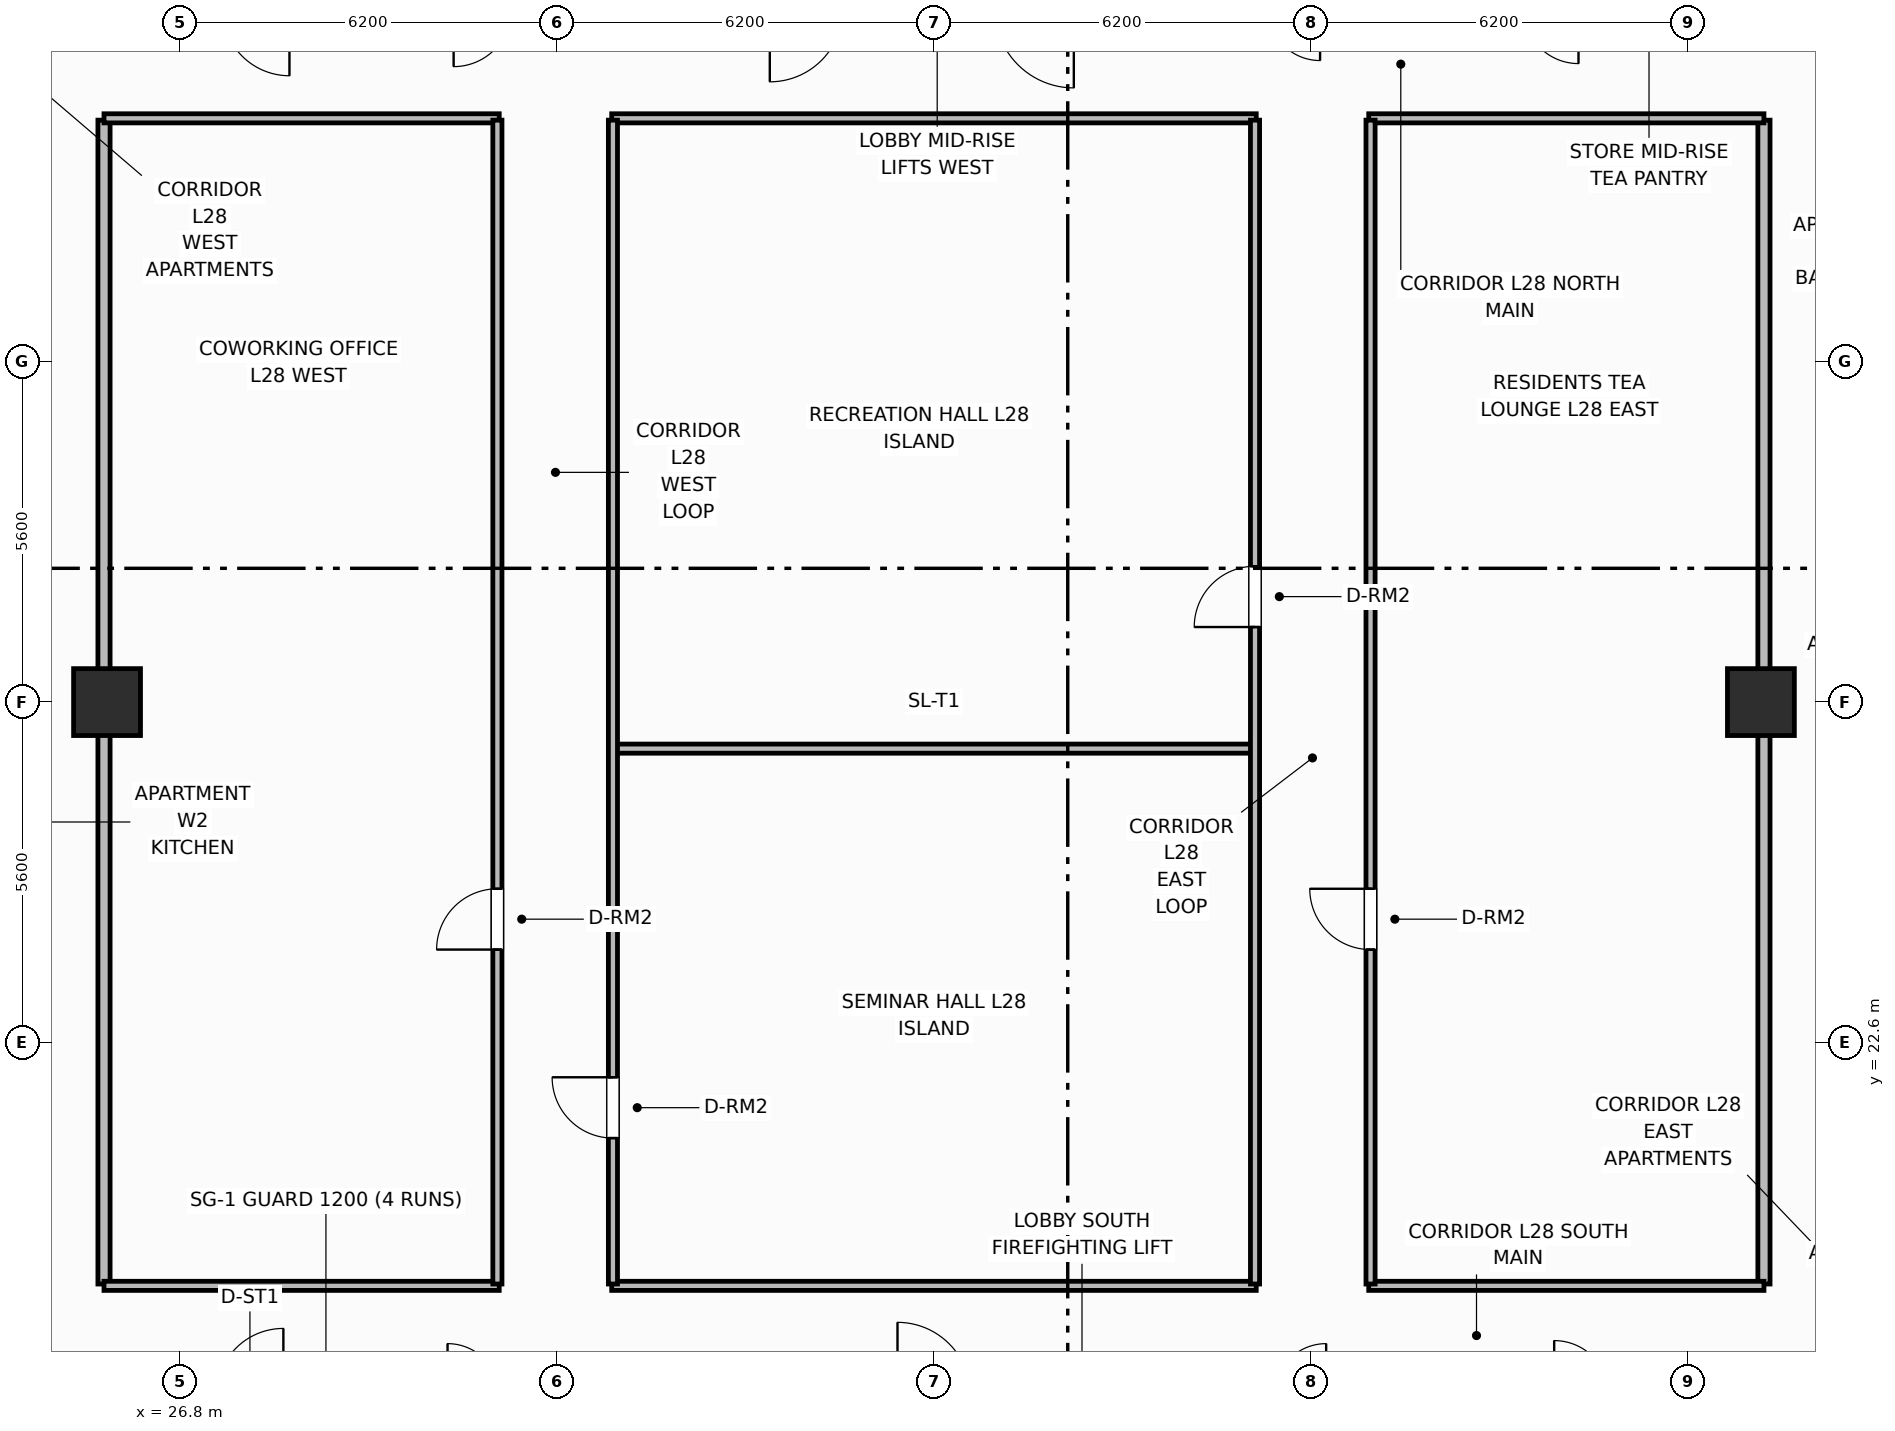
"""IFC4 building model, lengths in metres.
Left out: names, types, materials, properties, quantities, classifications, styles, units other than length and angle.
Written with IfcOpenShell. Run it as: python <this file> out.ifc"""

import sys

from ifc_helpers import new_model, si_unit, direction, frame, frame_2d, origin, origin_2d, place, context, subcontext, project, spatial, rectangle, extrude, element, fill, save


model = new_model("IFC4")
c1 = context("Model", 3, precision=1e-05, world=origin(), true_north=direction((0.0, 1.0)))
c2 = subcontext(c1, "Body", "Model", "MODEL_VIEW")
j1 = project(units=[si_unit("LENGTHUNIT", "METRE"), si_unit("PLANEANGLEUNIT", "RADIAN")], contexts=[c1])
p1 = place(None, origin())
s1 = spatial("IfcSite", under=j1, at=p1, CompositionType="ELEMENT")
p2 = place(p1, origin())
s2 = spatial("IfcBuilding", under=s1, at=p2, CompositionType="ELEMENT")
p3 = place(p2, frame((0.0, 0.0, 114.2)))
s3 = spatial("IfcBuildingStorey", under=s2, at=p3, CompositionType="ELEMENT", Elevation=114.2)
for number, where, z_axis, x_axis in (
    (1, (25.6, 28.2, 0.0), (0.0, 0.0, 1.0), (1.0, 0.0, 0.0)),
    (2, (52.8, 28.2, 0.0), (0.0, 0.0, 1.0), (1.0, 0.0, 0.0)),
):
    element("IfcColumn", number, at=place(p3, frame(where, z_axis=z_axis, x_axis=x_axis)), inside=s3, PredefinedType="COLUMN", context=c2, shape_type="SweptSolid", body=[
        extrude(rectangle(XDim=1.1, YDim=1.1, at=origin_2d()), origin(), (0.0, 0.0, 1.0), 3.7),
    ])
for number, where, z_axis, x_axis in (
    (3, (25.55, 18.63, 0.0), (0.0, 0.0, 1.0), (0.0, 1.0, 0.0)),
    (4, (52.85, 18.63, 0.0), (0.0, 0.0, 1.0), (0.0, 1.0, 0.0)),
):
    element("IfcWall", number, at=place(p3, frame(where, z_axis=z_axis, x_axis=x_axis)), inside=s3, PredefinedType="PARTITIONING", context=c2, shape_type="SweptSolid", body=[
        extrude(rectangle(XDim=19.14, YDim=0.2, at=frame_2d((9.57, 0.0))), origin(), (0.0, 0.0, 1.0), 2.53),
    ])
for number, where, z_axis, x_axis in (
    (5, (25.55, 18.6, 0.0), (0.0, 0.0, 1.0), (1.0, 0.0, 0.0)),
    (6, (25.55, 37.8, 0.0), (0.0, 0.0, 1.0), (1.0, 0.0, 0.0)),
):
    element("IfcWall", number, at=place(p3, frame(where, z_axis=z_axis, x_axis=x_axis)), inside=s3, PredefinedType="PARTITIONING", context=c2, shape_type="SweptSolid", body=[
        extrude(rectangle(XDim=6.5, YDim=0.15, at=frame_2d((3.25, 0.0))), origin(), (0.0, 0.0, 1.0), 2.53),
    ])
for number, where, z_axis, x_axis in (
    (7, (33.9, 18.6, 0.0), (0.0, 0.0, 1.0), (1.0, 0.0, 0.0)),
    (8, (33.9, 37.8, 0.0), (0.0, 0.0, 1.0), (1.0, 0.0, 0.0)),
):
    element("IfcWall", number, at=place(p3, frame(where, z_axis=z_axis, x_axis=x_axis)), inside=s3, PredefinedType="PARTITIONING", context=c2, shape_type="SweptSolid", body=[
        extrude(rectangle(XDim=10.6, YDim=0.15, at=frame_2d((5.3, 0.0))), origin(), (0.0, 0.0, 1.0), 2.53),
    ])
for number, where, z_axis, x_axis in (
    (9, (46.35, 18.6, 0.0), (0.0, 0.0, 1.0), (1.0, 0.0, 0.0)),
    (10, (46.35, 37.8, 0.0), (0.0, 0.0, 1.0), (1.0, 0.0, 0.0)),
):
    element("IfcWall", number, at=place(p3, frame(where, z_axis=z_axis, x_axis=x_axis)), inside=s3, PredefinedType="PARTITIONING", context=c2, shape_type="SweptSolid", body=[
        extrude(rectangle(XDim=6.5, YDim=0.15, at=frame_2d((3.25, 0.0))), origin(), (0.0, 0.0, 1.0), 2.53),
    ])
p4 = place(p3, frame((33.92, 27.434, 0.0), z_axis=(0.0, 0.0, 1.0), x_axis=(1.0, 0.0, 0.0)))
e11 = element("IfcWall", 11, at=p4, inside=s3, PredefinedType="PARTITIONING", context=c2, shape_type="SweptSolid", body=[
    extrude(rectangle(XDim=10.56, YDim=0.15, at=frame_2d((5.28, 0.0))), origin(), (0.0, 0.0, 1.0), 2.53),
])
p5 = place(p3, frame((32.02, 18.63, 0.0), z_axis=(0.0, 0.0, 1.0), x_axis=(0.0, 1.0, 0.0)))
e12 = element("IfcWall", 12, at=p5, inside=s3, PredefinedType="PARTITIONING", context=c2, shape_type="SweptSolid", body=[
    extrude(rectangle(XDim=19.14, YDim=0.15, at=frame_2d((9.57, 0.0))), origin(), (0.0, 0.0, 1.0), 2.53),
])
p6 = place(p5, frame((5.5, 0.0, 0.0)))
e13 = element("IfcOpeningElement", 13, at=p6, cuts=e12, PredefinedType="OPENING", context=c2, shape_type="SweptSolid", body=[
    extrude(rectangle(XDim=1.0, YDim=2.15, at=frame_2d((0.5, 1.075))), frame((0.0, 0.085, 0.0), z_axis=(0.0, -1.0, 0.0), x_axis=(1.0, 0.0, 0.0)), (0.0, 0.0, 1.0), 0.17),
])
p7 = place(p3, frame((33.92, 18.63, 0.0), z_axis=(0.0, 0.0, 1.0), x_axis=(0.0, 1.0, 0.0)))
e14 = element("IfcWall", 14, at=p7, inside=s3, PredefinedType="PARTITIONING", context=c2, shape_type="SweptSolid", body=[
    extrude(rectangle(XDim=19.14, YDim=0.15, at=frame_2d((9.57, 0.0))), origin(), (0.0, 0.0, 1.0), 2.53),
])
p8 = place(p7, frame((2.4, 0.0, 0.0)))
e15 = element("IfcOpeningElement", 15, at=p8, cuts=e14, PredefinedType="OPENING", context=c2, shape_type="SweptSolid", body=[
    extrude(rectangle(XDim=1.0, YDim=2.15, at=frame_2d((0.5, 1.075))), frame((0.0, 0.085, 0.0), z_axis=(0.0, -1.0, 0.0), x_axis=(1.0, 0.0, 0.0)), (0.0, 0.0, 1.0), 0.17),
])
p9 = place(p3, frame((44.48, 18.63, 0.0), z_axis=(0.0, 0.0, 1.0), x_axis=(0.0, 1.0, 0.0)))
e16 = element("IfcWall", 16, at=p9, inside=s3, PredefinedType="PARTITIONING", context=c2, shape_type="SweptSolid", body=[
    extrude(rectangle(XDim=19.14, YDim=0.15, at=frame_2d((9.57, 0.0))), origin(), (0.0, 0.0, 1.0), 2.53),
])
p10 = place(p9, frame((10.804, 0.0, 0.0)))
e17 = element("IfcOpeningElement", 17, at=p10, cuts=e16, PredefinedType="OPENING", context=c2, shape_type="SweptSolid", body=[
    extrude(rectangle(XDim=1.0, YDim=2.15, at=frame_2d((0.5, 1.075))), frame((0.0, 0.085, 0.0), z_axis=(0.0, -1.0, 0.0), x_axis=(1.0, 0.0, 0.0)), (0.0, 0.0, 1.0), 0.17),
])
p11 = place(p3, frame((46.38, 18.63, 0.0), z_axis=(0.0, 0.0, 1.0), x_axis=(0.0, 1.0, 0.0)))
e18 = element("IfcWall", 18, at=p11, inside=s3, PredefinedType="PARTITIONING", context=c2, shape_type="SweptSolid", body=[
    extrude(rectangle(XDim=19.14, YDim=0.15, at=frame_2d((9.57, 0.0))), origin(), (0.0, 0.0, 1.0), 2.53),
])
p12 = place(p11, frame((5.5, 0.0, 0.0)))
e19 = element("IfcOpeningElement", 19, at=p12, cuts=e18, PredefinedType="OPENING", context=c2, shape_type="SweptSolid", body=[
    extrude(rectangle(XDim=1.0, YDim=2.15, at=frame_2d((0.5, 1.075))), frame((0.0, 0.085, 0.0), z_axis=(0.0, -1.0, 0.0), x_axis=(1.0, 0.0, 0.0)), (0.0, 0.0, 1.0), 0.17),
])
p13 = place(p6, origin())
e20 = element("IfcDoor", 20, at=p13, inside=s3, OperationType="SINGLE_SWING_LEFT", PredefinedType="DOOR", context=c2, shape_type="SweptSolid", body=[
    extrude(rectangle(XDim=1.0, YDim=2.15, at=frame_2d((0.5, 1.075))), frame((0.0, 0.025, 0.0), z_axis=(0.0, -1.0, 0.0), x_axis=(1.0, 0.0, 0.0)), (0.0, 0.0, 1.0), 0.05),
])
fill(e13, e20)
p14 = place(p8, origin())
e21 = element("IfcDoor", 21, at=p14, inside=s3, OperationType="SINGLE_SWING_RIGHT", PredefinedType="DOOR", context=c2, shape_type="SweptSolid", body=[
    extrude(rectangle(XDim=1.0, YDim=2.15, at=frame_2d((0.5, 1.075))), frame((0.0, 0.025, 0.0), z_axis=(0.0, -1.0, 0.0), x_axis=(1.0, 0.0, 0.0)), (0.0, 0.0, 1.0), 0.05),
])
fill(e15, e21)
p15 = place(p10, origin())
e22 = element("IfcDoor", 22, at=p15, inside=s3, OperationType="SINGLE_SWING_LEFT", PredefinedType="DOOR", context=c2, shape_type="SweptSolid", body=[
    extrude(rectangle(XDim=1.0, YDim=2.15, at=frame_2d((0.5, 1.075))), frame((0.0, 0.025, 0.0), z_axis=(0.0, -1.0, 0.0), x_axis=(1.0, 0.0, 0.0)), (0.0, 0.0, 1.0), 0.05),
])
fill(e17, e22)
p16 = place(p12, origin())
e23 = element("IfcDoor", 23, at=p16, inside=s3, OperationType="SINGLE_SWING_RIGHT", PredefinedType="DOOR", context=c2, shape_type="SweptSolid", body=[
    extrude(rectangle(XDim=1.0, YDim=2.15, at=frame_2d((0.5, 1.075))), frame((0.0, 0.025, 0.0), z_axis=(0.0, -1.0, 0.0), x_axis=(1.0, 0.0, 0.0)), (0.0, 0.0, 1.0), 0.05),
])
fill(e19, e23)
save(model, sys.argv[1])
